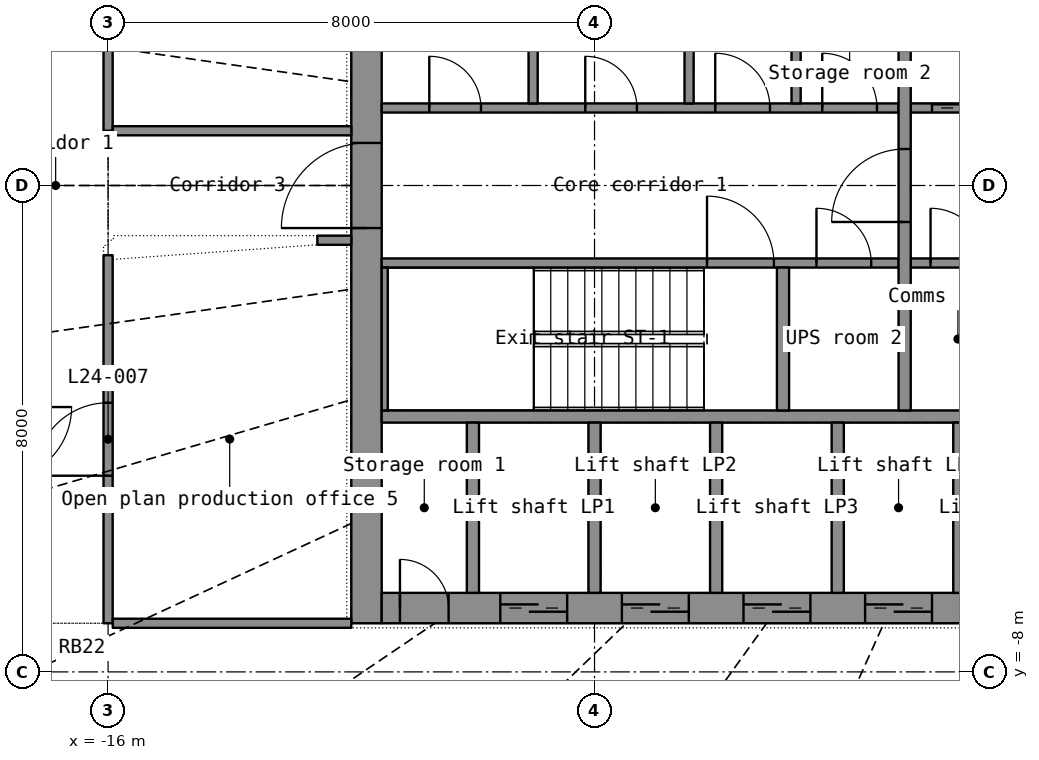
"""IFC4 building model, lengths in metres.
Left out: names, types, materials, properties, quantities, classifications, styles, units other than length and angle.
Written with IfcOpenShell. Run it as: python <this file> out.ifc"""

import sys

from ifc_helpers import new_model, si_unit, direction, frame, frame_2d, origin, place, context, subcontext, project, spatial, rectangle, extrude, element, fill, save


model = new_model("IFC4")
c1 = context("Model", 3, precision=1e-05, world=origin(), true_north=direction((0.0, 1.0)))
c2 = subcontext(c1, "Body", "Model", "MODEL_VIEW")
j1 = project(units=[si_unit("LENGTHUNIT", "METRE"), si_unit("PLANEANGLEUNIT", "RADIAN")], contexts=[c1])
p1 = place(None, origin())
s1 = spatial("IfcSite", under=j1, at=p1, CompositionType="ELEMENT")
p2 = place(p1, origin())
s2 = spatial("IfcBuilding", under=s1, at=p2, CompositionType="ELEMENT")
p3 = place(p2, frame((0.0, 0.0, 104.5)))
s3 = spatial("IfcBuildingStorey", under=s2, at=p3, CompositionType="ELEMENT", Elevation=104.5)
p4 = place(p3, frame((-11.75, -7.2, 0.0), z_axis=(0.0, 0.0, 1.0), x_axis=(0.0, 1.0, 0.0)))
e1 = element("IfcWall", 1, at=p4, inside=s3, PredefinedType="SHEAR", context=c2, shape_type="SweptSolid", body=[
    extrude(rectangle(XDim=14.4, YDim=0.5, at=frame_2d((7.2, 0.0))), origin(), (0.0, 0.0, 1.0), 3.3),
])
p5 = place(p4, frame((6.5, 0.0, 0.0)))
e2 = element("IfcOpeningElement", 2, at=p5, cuts=e1, PredefinedType="OPENING", context=c2, shape_type="SweptSolid", body=[
    extrude(rectangle(XDim=1.4, YDim=2.2, at=frame_2d((0.7, 1.1))), frame((0.0, 0.26, 0.0), z_axis=(0.0, -1.0, 0.0), x_axis=(1.0, 0.0, 0.0)), (0.0, 0.0, 1.0), 0.52),
])
p6 = place(p3, frame((-11.5, -6.95, 0.0), z_axis=(0.0, 0.0, 1.0), x_axis=(1.0, 0.0, 0.0)))
e3 = element("IfcWall", 3, at=p6, inside=s3, PredefinedType="SHEAR", context=c2, shape_type="SweptSolid", body=[
    extrude(rectangle(XDim=23.0, YDim=0.5, at=frame_2d((11.5, 0.0))), origin(), (0.0, 0.0, 1.0), 3.3),
])
p7 = place(p6, frame((1.95, 0.0, 0.0)))
e4 = element("IfcOpeningElement", 4, at=p7, cuts=e3, PredefinedType="OPENING", context=c2, shape_type="SweptSolid", body=[
    extrude(rectangle(XDim=1.1, YDim=2.2, at=frame_2d((0.55, 1.1))), frame((0.0, 0.26, 0.0), z_axis=(0.0, -1.0, 0.0), x_axis=(1.0, 0.0, 0.0)), (0.0, 0.0, 1.0), 0.52),
])
p8 = place(p6, frame((3.95, 0.0, 0.0)))
e5 = element("IfcOpeningElement", 5, at=p8, cuts=e3, PredefinedType="OPENING", context=c2, shape_type="SweptSolid", body=[
    extrude(rectangle(XDim=1.1, YDim=2.2, at=frame_2d((0.55, 1.1))), frame((0.0, 0.26, 0.0), z_axis=(0.0, -1.0, 0.0), x_axis=(1.0, 0.0, 0.0)), (0.0, 0.0, 1.0), 0.52),
])
p9 = place(p6, frame((5.95, 0.0, 0.0)))
e6 = element("IfcOpeningElement", 6, at=p9, cuts=e3, PredefinedType="OPENING", context=c2, shape_type="SweptSolid", body=[
    extrude(rectangle(XDim=1.1, YDim=2.2, at=frame_2d((0.55, 1.1))), frame((0.0, 0.26, 0.0), z_axis=(0.0, -1.0, 0.0), x_axis=(1.0, 0.0, 0.0)), (0.0, 0.0, 1.0), 0.52),
])
p10 = place(p6, frame((7.95, 0.0, 0.0)))
e7 = element("IfcOpeningElement", 7, at=p10, cuts=e3, PredefinedType="OPENING", context=c2, shape_type="SweptSolid", body=[
    extrude(rectangle(XDim=1.1, YDim=2.2, at=frame_2d((0.55, 1.1))), frame((0.0, 0.26, 0.0), z_axis=(0.0, -1.0, 0.0), x_axis=(1.0, 0.0, 0.0)), (0.0, 0.0, 1.0), 0.52),
])
p11 = place(p6, frame((9.95, 0.0, 0.0)))
e8 = element("IfcOpeningElement", 8, at=p11, cuts=e3, PredefinedType="OPENING", context=c2, shape_type="SweptSolid", body=[
    extrude(rectangle(XDim=1.1, YDim=2.2, at=frame_2d((0.55, 1.1))), frame((0.0, 0.26, 0.0), z_axis=(0.0, -1.0, 0.0), x_axis=(1.0, 0.0, 0.0)), (0.0, 0.0, 1.0), 0.52),
])
p12 = place(p6, frame((11.95, 0.0, 0.0)))
e9 = element("IfcOpeningElement", 9, at=p12, cuts=e3, PredefinedType="OPENING", context=c2, shape_type="SweptSolid", body=[
    extrude(rectangle(XDim=1.1, YDim=2.2, at=frame_2d((0.55, 1.1))), frame((0.0, 0.26, 0.0), z_axis=(0.0, -1.0, 0.0), x_axis=(1.0, 0.0, 0.0)), (0.0, 0.0, 1.0), 0.52),
])
p13 = place(p6, frame((13.95, 0.0, 0.0)))
e10 = element("IfcOpeningElement", 10, at=p13, cuts=e3, PredefinedType="OPENING", context=c2, shape_type="SweptSolid", body=[
    extrude(rectangle(XDim=1.1, YDim=2.2, at=frame_2d((0.55, 1.1))), frame((0.0, 0.26, 0.0), z_axis=(0.0, -1.0, 0.0), x_axis=(1.0, 0.0, 0.0)), (0.0, 0.0, 1.0), 0.52),
])
p14 = place(p6, frame((15.95, 0.0, 0.0)))
e11 = element("IfcOpeningElement", 11, at=p14, cuts=e3, PredefinedType="OPENING", context=c2, shape_type="SweptSolid", body=[
    extrude(rectangle(XDim=1.1, YDim=2.2, at=frame_2d((0.55, 1.1))), frame((0.0, 0.26, 0.0), z_axis=(0.0, -1.0, 0.0), x_axis=(1.0, 0.0, 0.0)), (0.0, 0.0, 1.0), 0.52),
])
p15 = place(p6, frame((19.95, 0.0, 0.0)))
e12 = element("IfcOpeningElement", 12, at=p15, cuts=e3, PredefinedType="OPENING", context=c2, shape_type="SweptSolid", body=[
    extrude(rectangle(XDim=1.1, YDim=2.2, at=frame_2d((0.55, 1.1))), frame((0.0, 0.26, 0.0), z_axis=(0.0, -1.0, 0.0), x_axis=(1.0, 0.0, 0.0)), (0.0, 0.0, 1.0), 0.52),
])
p16 = place(p6, frame((0.3, 0.0, 0.0)))
e13 = element("IfcOpeningElement", 13, at=p16, cuts=e3, PredefinedType="OPENING", context=c2, shape_type="SweptSolid", body=[
    extrude(rectangle(XDim=0.8, YDim=2.05, at=frame_2d((0.4, 1.025))), frame((0.0, 0.26, 0.0), z_axis=(0.0, -1.0, 0.0), x_axis=(1.0, 0.0, 0.0)), (0.0, 0.0, 1.0), 0.52),
])
p17 = place(p6, frame((21.9, 0.0, 0.0)))
e14 = element("IfcOpeningElement", 14, at=p17, cuts=e3, PredefinedType="OPENING", context=c2, shape_type="SweptSolid", body=[
    extrude(rectangle(XDim=0.8, YDim=2.05, at=frame_2d((0.4, 1.025))), frame((0.0, 0.26, 0.0), z_axis=(0.0, -1.0, 0.0), x_axis=(1.0, 0.0, 0.0)), (0.0, 0.0, 1.0), 0.52),
])
p18 = place(p3, frame((-11.5, -3.8, 0.0), z_axis=(0.0, 0.0, 1.0), x_axis=(1.0, 0.0, 0.0)))
e15 = element("IfcWall", 15, at=p18, inside=s3, PredefinedType="SHEAR", context=c2, shape_type="SweptSolid", body=[
    extrude(rectangle(XDim=23.0, YDim=0.2, at=frame_2d((11.5, 0.0))), origin(), (0.0, 0.0, 1.0), 3.3),
])
for number, where, z_axis, x_axis in (
    (16, (-10.0, -6.7, 0.0), (0.0, 0.0, 1.0), (0.0, 1.0, 0.0)),
    (17, (-8.0, -6.7, 0.0), (0.0, 0.0, 1.0), (0.0, 1.0, 0.0)),
    (18, (-6.0, -6.7, 0.0), (0.0, 0.0, 1.0), (0.0, 1.0, 0.0)),
    (19, (-4.0, -6.7, 0.0), (0.0, 0.0, 1.0), (0.0, 1.0, 0.0)),
    (20, (-2.0, -6.7, 0.0), (0.0, 0.0, 1.0), (0.0, 1.0, 0.0)),
):
    element("IfcWall", number, at=place(p3, frame(where, z_axis=z_axis, x_axis=x_axis)), inside=s3, PredefinedType="SHEAR", context=c2, shape_type="SweptSolid", body=[
        extrude(rectangle(XDim=2.8, YDim=0.2, at=frame_2d((1.4, 0.0))), origin(), (0.0, 0.0, 1.0), 3.3),
    ])
p19 = place(p3, frame((-11.5, -1.275, 0.0), z_axis=(0.0, 0.0, 1.0), x_axis=(1.0, 0.0, 0.0)))
e21 = element("IfcWall", 21, at=p19, inside=s3, PredefinedType="SHEAR", context=c2, shape_type="SweptSolid", body=[
    extrude(rectangle(XDim=8.5, YDim=0.15, at=frame_2d((4.25, 0.0))), origin(), (0.0, 0.0, 1.0), 3.3),
])
p20 = place(p19, frame((5.35, 0.0, 0.0)))
e22 = element("IfcOpeningElement", 22, at=p20, cuts=e21, PredefinedType="OPENING", context=c2, shape_type="SweptSolid", body=[
    extrude(rectangle(XDim=1.1, YDim=2.15, at=frame_2d((0.55, 1.075))), frame((0.0, 0.085, 0.0), z_axis=(0.0, -1.0, 0.0), x_axis=(1.0, 0.0, 0.0)), (0.0, 0.0, 1.0), 0.17),
])
p21 = place(p19, frame((7.15, 0.0, 0.0)))
e23 = element("IfcOpeningElement", 23, at=p21, cuts=e21, PredefinedType="OPENING", context=c2, shape_type="SweptSolid", body=[
    extrude(rectangle(XDim=0.9, YDim=2.1, at=frame_2d((0.45, 1.05))), frame((0.0, 0.085, 0.0), z_axis=(0.0, -1.0, 0.0), x_axis=(1.0, 0.0, 0.0)), (0.0, 0.0, 1.0), 0.17),
])
p22 = place(p3, frame((-2.8, -1.275, 0.0), z_axis=(0.0, 0.0, 1.0), x_axis=(1.0, 0.0, 0.0)))
e24 = element("IfcWall", 24, at=p22, inside=s3, PredefinedType="SHEAR", context=c2, shape_type="SweptSolid", body=[
    extrude(rectangle(XDim=5.6, YDim=0.15, at=frame_2d((2.8, 0.0))), origin(), (0.0, 0.0, 1.0), 3.3),
])
p23 = place(p22, frame((4.15, 0.0, 0.0)))
e25 = element("IfcOpeningElement", 25, at=p23, cuts=e24, PredefinedType="OPENING", context=c2, shape_type="SweptSolid", body=[
    extrude(rectangle(XDim=1.1, YDim=2.2, at=frame_2d((0.55, 1.1))), frame((0.0, 0.085, 0.0), z_axis=(0.0, -1.0, 0.0), x_axis=(1.0, 0.0, 0.0)), (0.0, 0.0, 1.0), 0.17),
])
p24 = place(p22, frame((0.326, 0.0, 0.0)))
e26 = element("IfcOpeningElement", 26, at=p24, cuts=e24, PredefinedType="OPENING", context=c2, shape_type="SweptSolid", body=[
    extrude(rectangle(XDim=0.9, YDim=2.1, at=frame_2d((0.45, 1.05))), frame((0.0, 0.085, 0.0), z_axis=(0.0, -1.0, 0.0), x_axis=(1.0, 0.0, 0.0)), (0.0, 0.0, 1.0), 0.17),
])
p25 = place(p22, frame((2.201, 0.0, 0.0)))
e27 = element("IfcOpeningElement", 27, at=p25, cuts=e24, PredefinedType="OPENING", context=c2, shape_type="SweptSolid", body=[
    extrude(rectangle(XDim=0.9, YDim=2.1, at=frame_2d((0.45, 1.05))), frame((0.0, 0.085, 0.0), z_axis=(0.0, -1.0, 0.0), x_axis=(1.0, 0.0, 0.0)), (0.0, 0.0, 1.0), 0.17),
])
p26 = place(p3, frame((-11.5, 1.275, 0.0), z_axis=(0.0, 0.0, 1.0), x_axis=(1.0, 0.0, 0.0)))
e28 = element("IfcWall", 28, at=p26, inside=s3, PredefinedType="PARTITIONING", context=c2, shape_type="SweptSolid", body=[
    extrude(rectangle(XDim=8.5, YDim=0.15, at=frame_2d((4.25, 0.0))), origin(), (0.0, 0.0, 1.0), 3.3),
])
p27 = place(p26, frame((0.782, 0.0, 0.0)))
e29 = element("IfcOpeningElement", 29, at=p27, cuts=e28, PredefinedType="OPENING", context=c2, shape_type="SweptSolid", body=[
    extrude(rectangle(XDim=0.85, YDim=2.1, at=frame_2d((0.425, 1.05))), frame((0.0, 0.085, 0.0), z_axis=(0.0, -1.0, 0.0), x_axis=(1.0, 0.0, 0.0)), (0.0, 0.0, 1.0), 0.17),
])
p28 = place(p26, frame((3.347, 0.0, 0.0)))
e30 = element("IfcOpeningElement", 30, at=p28, cuts=e28, PredefinedType="OPENING", context=c2, shape_type="SweptSolid", body=[
    extrude(rectangle(XDim=0.85, YDim=2.1, at=frame_2d((0.425, 1.05))), frame((0.0, 0.085, 0.0), z_axis=(0.0, -1.0, 0.0), x_axis=(1.0, 0.0, 0.0)), (0.0, 0.0, 1.0), 0.17),
])
p29 = place(p26, frame((5.485, 0.0, 0.0)))
e31 = element("IfcOpeningElement", 31, at=p29, cuts=e28, PredefinedType="OPENING", context=c2, shape_type="SweptSolid", body=[
    extrude(rectangle(XDim=0.9, YDim=2.1, at=frame_2d((0.45, 1.05))), frame((0.0, 0.085, 0.0), z_axis=(0.0, -1.0, 0.0), x_axis=(1.0, 0.0, 0.0)), (0.0, 0.0, 1.0), 0.17),
])
p30 = place(p26, frame((7.245, 0.0, 0.0)))
e32 = element("IfcOpeningElement", 32, at=p30, cuts=e28, PredefinedType="OPENING", context=c2, shape_type="SweptSolid", body=[
    extrude(rectangle(XDim=0.9, YDim=2.1, at=frame_2d((0.45, 1.05))), frame((0.0, 0.085, 0.0), z_axis=(0.0, -1.0, 0.0), x_axis=(1.0, 0.0, 0.0)), (0.0, 0.0, 1.0), 0.17),
])
p31 = place(p3, frame((-2.8, 1.275, 0.0), z_axis=(0.0, 0.0, 1.0), x_axis=(1.0, 0.0, 0.0)))
e33 = element("IfcWall", 33, at=p31, inside=s3, PredefinedType="SHEAR", context=c2, shape_type="SweptSolid", body=[
    extrude(rectangle(XDim=5.6, YDim=0.15, at=frame_2d((2.8, 0.0))), origin(), (0.0, 0.0, 1.0), 3.3),
])
p32 = place(p31, frame((0.35, 0.0, 0.0)))
e34 = element("IfcOpeningElement", 34, at=p32, cuts=e33, PredefinedType="OPENING", context=c2, shape_type="SweptSolid", body=[
    extrude(rectangle(XDim=1.1, YDim=2.2, at=frame_2d((0.55, 1.1))), frame((0.0, 0.085, 0.0), z_axis=(0.0, -1.0, 0.0), x_axis=(1.0, 0.0, 0.0)), (0.0, 0.0, 1.0), 0.17),
])
p33 = place(p31, frame((2.499, 0.0, 0.0)))
e35 = element("IfcOpeningElement", 35, at=p33, cuts=e33, PredefinedType="OPENING", context=c2, shape_type="SweptSolid", body=[
    extrude(rectangle(XDim=0.9, YDim=2.1, at=frame_2d((0.45, 1.05))), frame((0.0, 0.085, 0.0), z_axis=(0.0, -1.0, 0.0), x_axis=(1.0, 0.0, 0.0)), (0.0, 0.0, 1.0), 0.17),
])
p34 = place(p31, frame((4.374, 0.0, 0.0)))
e36 = element("IfcOpeningElement", 36, at=p34, cuts=e33, PredefinedType="OPENING", context=c2, shape_type="SweptSolid", body=[
    extrude(rectangle(XDim=0.9, YDim=2.1, at=frame_2d((0.45, 1.05))), frame((0.0, 0.085, 0.0), z_axis=(0.0, -1.0, 0.0), x_axis=(1.0, 0.0, 0.0)), (0.0, 0.0, 1.0), 0.17),
])
p35 = place(p3, frame((-2.9, -3.7, 0.0), z_axis=(0.0, 0.0, 1.0), x_axis=(0.0, 1.0, 0.0)))
e37 = element("IfcWall", 37, at=p35, inside=s3, PredefinedType="SHEAR", context=c2, shape_type="SweptSolid", body=[
    extrude(rectangle(XDim=7.4, YDim=0.2, at=frame_2d((3.7, 0.0))), origin(), (0.0, 0.0, 1.0), 3.3),
])
p36 = place(p35, frame((3.1, 0.0, 0.0)))
e38 = element("IfcOpeningElement", 38, at=p36, cuts=e37, PredefinedType="OPENING", context=c2, shape_type="SweptSolid", body=[
    extrude(rectangle(XDim=1.2, YDim=2.2, at=frame_2d((0.6, 1.1))), frame((0.0, 0.11, 0.0), z_axis=(0.0, -1.0, 0.0), x_axis=(1.0, 0.0, 0.0)), (0.0, 0.0, 1.0), 0.22),
])
p37 = place(p3, frame((-11.45, -3.7, 0.0), z_axis=(0.0, 0.0, 1.0), x_axis=(0.0, 1.0, 0.0)))
e39 = element("IfcWall", 39, at=p37, inside=s3, PredefinedType="SHEAR", context=c2, shape_type="SweptSolid", body=[
    extrude(rectangle(XDim=2.35, YDim=0.1, at=frame_2d((1.175, 0.0))), origin(), (0.0, 0.0, 1.0), 3.3),
])
p38 = place(p3, frame((-4.9, -3.7, 0.0), z_axis=(0.0, 0.0, 1.0), x_axis=(0.0, 1.0, 0.0)))
e40 = element("IfcWall", 40, at=p38, inside=s3, PredefinedType="SHEAR", context=c2, shape_type="SweptSolid", body=[
    extrude(rectangle(XDim=2.35, YDim=0.2, at=frame_2d((1.175, 0.0))), origin(), (0.0, 0.0, 1.0), 3.3),
])
for number, where, z_axis, x_axis in (
    (41, (-9.01, 1.35, 0.0), (0.0, 0.0, 1.0), (0.0, 1.0, 0.0)),
    (42, (-6.445, 1.35, 0.0), (0.0, 0.0, 1.0), (0.0, 1.0, 0.0)),
    (43, (-4.685, 1.35, 0.0), (0.0, 0.0, 1.0), (0.0, 1.0, 0.0)),
):
    element("IfcWall", number, at=place(p3, frame(where, z_axis=z_axis, x_axis=x_axis)), inside=s3, PredefinedType="PARTITIONING", context=c2, shape_type="SweptSolid", body=[
        extrude(rectangle(XDim=2.35, YDim=0.15, at=frame_2d((1.175, 0.0))), origin(), (0.0, 0.0, 1.0), 3.3),
    ])
p39 = place(p3, frame((-16.0, 0.9, 0.0), z_axis=(0.0, 0.0, 1.0), x_axis=(0.0, 1.0, 0.0)))
e44 = element("IfcWall", 44, at=p39, inside=s3, PredefinedType="PARTITIONING", context=c2, shape_type="SweptSolid", body=[
    extrude(rectangle(XDim=6.3, YDim=0.15, at=frame_2d((3.15, 0.0))), origin(), (0.0, 0.0, 1.0), 2.4),
])
p40 = place(p39, frame((2.55, 0.0, 0.0)))
e45 = element("IfcOpeningElement", 45, at=p40, cuts=e44, PredefinedType="OPENING", context=c2, shape_type="SweptSolid", body=[
    extrude(rectangle(XDim=1.2, YDim=2.2, at=frame_2d((0.6, 1.1))), frame((0.0, 0.085, 0.0), z_axis=(0.0, -1.0, 0.0), x_axis=(1.0, 0.0, 0.0)), (0.0, 0.0, 1.0), 0.17),
])
p41 = place(p3, frame((-16.0, -7.2, 0.0), z_axis=(0.0, 0.0, 1.0), x_axis=(0.0, 1.0, 0.0)))
e46 = element("IfcWall", 46, at=p41, inside=s3, PredefinedType="PARTITIONING", context=c2, shape_type="SweptSolid", body=[
    extrude(rectangle(XDim=6.053, YDim=0.15, at=frame_2d((3.027, 0.0))), origin(), (0.0, 0.0, 1.0), 2.4),
])
p42 = place(p41, frame((2.427, 0.0, 0.0)))
e47 = element("IfcOpeningElement", 47, at=p42, cuts=e46, PredefinedType="OPENING", context=c2, shape_type="SweptSolid", body=[
    extrude(rectangle(XDim=1.2, YDim=2.2, at=frame_2d((0.6, 1.1))), frame((0.0, 0.085, 0.0), z_axis=(0.0, -1.0, 0.0), x_axis=(1.0, 0.0, 0.0)), (0.0, 0.0, 1.0), 0.17),
])
for number, where, z_axis, x_axis in (
    (48, (-12.0, -7.2, 0.0), (0.0, 0.0, 1.0), (-1.0, 0.0, 0.0)),
    (49, (-12.0, 0.9, 0.0), (0.0, 0.0, 1.0), (-1.0, 0.0, 0.0)),
):
    element("IfcWall", number, at=place(p3, frame(where, z_axis=z_axis, x_axis=x_axis)), inside=s3, PredefinedType="PARTITIONING", context=c2, shape_type="SweptSolid", body=[
        extrude(rectangle(XDim=3.923, YDim=0.15, at=frame_2d((1.961, 0.0))), origin(), (0.0, 0.0, 1.0), 2.4),
    ])
p43 = place(p3, frame((-12.559, -0.9, 0.0), z_axis=(0.0, 0.0, 1.0), x_axis=(1.0, 0.0, 0.0)))
e50 = element("IfcWall", 50, at=p43, inside=s3, PredefinedType="PARTITIONING", context=c2, shape_type="SweptSolid", body=[
    extrude(rectangle(XDim=0.559, YDim=0.15, at=frame_2d((0.279, 0.0))), origin(), (0.0, 0.0, 1.0), 2.4),
])
p44 = place(p7, origin())
e51 = element("IfcDoor", 51, at=p44, inside=s3, OperationType="DOUBLE_DOOR_SLIDING", PredefinedType="DOOR", context=c2, shape_type="SweptSolid", body=[
    extrude(rectangle(XDim=1.1, YDim=2.2, at=frame_2d((0.55, 1.1))), frame((0.0, 0.025, 0.0), z_axis=(0.0, -1.0, 0.0), x_axis=(1.0, 0.0, 0.0)), (0.0, 0.0, 1.0), 0.05),
])
fill(e4, e51)
p45 = place(p8, origin())
e52 = element("IfcDoor", 52, at=p45, inside=s3, OperationType="DOUBLE_DOOR_SLIDING", PredefinedType="DOOR", context=c2, shape_type="SweptSolid", body=[
    extrude(rectangle(XDim=1.1, YDim=2.2, at=frame_2d((0.55, 1.1))), frame((0.0, 0.025, 0.0), z_axis=(0.0, -1.0, 0.0), x_axis=(1.0, 0.0, 0.0)), (0.0, 0.0, 1.0), 0.05),
])
fill(e5, e52)
p46 = place(p9, origin())
e53 = element("IfcDoor", 53, at=p46, inside=s3, OperationType="DOUBLE_DOOR_SLIDING", PredefinedType="DOOR", context=c2, shape_type="SweptSolid", body=[
    extrude(rectangle(XDim=1.1, YDim=2.2, at=frame_2d((0.55, 1.1))), frame((0.0, 0.025, 0.0), z_axis=(0.0, -1.0, 0.0), x_axis=(1.0, 0.0, 0.0)), (0.0, 0.0, 1.0), 0.05),
])
fill(e6, e53)
p47 = place(p10, origin())
e54 = element("IfcDoor", 54, at=p47, inside=s3, OperationType="DOUBLE_DOOR_SLIDING", PredefinedType="DOOR", context=c2, shape_type="SweptSolid", body=[
    extrude(rectangle(XDim=1.1, YDim=2.2, at=frame_2d((0.55, 1.1))), frame((0.0, 0.025, 0.0), z_axis=(0.0, -1.0, 0.0), x_axis=(1.0, 0.0, 0.0)), (0.0, 0.0, 1.0), 0.05),
])
fill(e7, e54)
p48 = place(p16, origin())
e55 = element("IfcDoor", 55, at=p48, inside=s3, OperationType="SINGLE_SWING_LEFT", PredefinedType="DOOR", context=c2, shape_type="SweptSolid", body=[
    extrude(rectangle(XDim=0.8, YDim=2.05, at=frame_2d((0.4, 1.025))), frame((0.0, 0.025, 0.0), z_axis=(0.0, -1.0, 0.0), x_axis=(1.0, 0.0, 0.0)), (0.0, 0.0, 1.0), 0.05),
])
fill(e13, e55)
p49 = place(p5, origin())
e56 = element("IfcDoor", 56, at=p49, inside=s3, OperationType="DOUBLE_DOOR_SINGLE_SWING", PredefinedType="DOOR", context=c2, shape_type="SweptSolid", body=[
    extrude(rectangle(XDim=1.4, YDim=2.2, at=frame_2d((0.7, 1.1))), frame((0.0, 0.025, 0.0), z_axis=(0.0, -1.0, 0.0), x_axis=(1.0, 0.0, 0.0)), (0.0, 0.0, 1.0), 0.05),
])
fill(e2, e56)
p50 = place(p36, origin())
e57 = element("IfcDoor", 57, at=p50, inside=s3, OperationType="SINGLE_SWING_LEFT", PredefinedType="DOOR", context=c2, shape_type="SweptSolid", body=[
    extrude(rectangle(XDim=1.2, YDim=2.2, at=frame_2d((0.6, 1.1))), frame((0.0, 0.025, 0.0), z_axis=(0.0, -1.0, 0.0), x_axis=(1.0, 0.0, 0.0)), (0.0, 0.0, 1.0), 0.05),
])
fill(e38, e57)
p51 = place(p32, origin())
e58 = element("IfcDoor", 58, at=p51, inside=s3, OperationType="DOUBLE_DOOR_SLIDING", PredefinedType="DOOR", context=c2, shape_type="SweptSolid", body=[
    extrude(rectangle(XDim=1.1, YDim=2.2, at=frame_2d((0.55, 1.1))), frame((0.0, 0.025, 0.0), z_axis=(0.0, -1.0, 0.0), x_axis=(1.0, 0.0, 0.0)), (0.0, 0.0, 1.0), 0.05),
])
fill(e34, e58)
p52 = place(p20, origin())
e59 = element("IfcDoor", 59, at=p52, inside=s3, OperationType="SINGLE_SWING_LEFT", PredefinedType="DOOR", context=c2, shape_type="SweptSolid", body=[
    extrude(rectangle(XDim=1.1, YDim=2.15, at=frame_2d((0.55, 1.075))), frame((0.0, 0.025, 0.0), z_axis=(0.0, -1.0, 0.0), x_axis=(1.0, 0.0, 0.0)), (0.0, 0.0, 1.0), 0.05),
])
fill(e22, e59)
p53 = place(p27, origin())
e60 = element("IfcDoor", 60, at=p53, inside=s3, OperationType="SINGLE_SWING_LEFT", PredefinedType="DOOR", context=c2, shape_type="SweptSolid", body=[
    extrude(rectangle(XDim=0.85, YDim=2.1, at=frame_2d((0.425, 1.05))), frame((0.0, 0.025, 0.0), z_axis=(0.0, -1.0, 0.0), x_axis=(1.0, 0.0, 0.0)), (0.0, 0.0, 1.0), 0.05),
])
fill(e29, e60)
p54 = place(p28, origin())
e61 = element("IfcDoor", 61, at=p54, inside=s3, OperationType="SINGLE_SWING_LEFT", PredefinedType="DOOR", context=c2, shape_type="SweptSolid", body=[
    extrude(rectangle(XDim=0.85, YDim=2.1, at=frame_2d((0.425, 1.05))), frame((0.0, 0.025, 0.0), z_axis=(0.0, -1.0, 0.0), x_axis=(1.0, 0.0, 0.0)), (0.0, 0.0, 1.0), 0.05),
])
fill(e30, e61)
p55 = place(p29, origin())
e62 = element("IfcDoor", 62, at=p55, inside=s3, OperationType="SINGLE_SWING_LEFT", PredefinedType="DOOR", context=c2, shape_type="SweptSolid", body=[
    extrude(rectangle(XDim=0.9, YDim=2.1, at=frame_2d((0.45, 1.05))), frame((0.0, 0.025, 0.0), z_axis=(0.0, -1.0, 0.0), x_axis=(1.0, 0.0, 0.0)), (0.0, 0.0, 1.0), 0.05),
])
fill(e31, e62)
p56 = place(p30, origin())
e63 = element("IfcDoor", 63, at=p56, inside=s3, OperationType="SINGLE_SWING_LEFT", PredefinedType="DOOR", context=c2, shape_type="SweptSolid", body=[
    extrude(rectangle(XDim=0.9, YDim=2.1, at=frame_2d((0.45, 1.05))), frame((0.0, 0.025, 0.0), z_axis=(0.0, -1.0, 0.0), x_axis=(1.0, 0.0, 0.0)), (0.0, 0.0, 1.0), 0.05),
])
fill(e32, e63)
p57 = place(p24, origin())
e64 = element("IfcDoor", 64, at=p57, inside=s3, OperationType="SINGLE_SWING_LEFT", PredefinedType="DOOR", context=c2, shape_type="SweptSolid", body=[
    extrude(rectangle(XDim=0.9, YDim=2.1, at=frame_2d((0.45, 1.05))), frame((0.0, 0.025, 0.0), z_axis=(0.0, -1.0, 0.0), x_axis=(1.0, 0.0, 0.0)), (0.0, 0.0, 1.0), 0.05),
])
fill(e26, e64)
p58 = place(p21, origin())
e65 = element("IfcDoor", 65, at=p58, inside=s3, OperationType="SINGLE_SWING_LEFT", PredefinedType="DOOR", context=c2, shape_type="SweptSolid", body=[
    extrude(rectangle(XDim=0.9, YDim=2.1, at=frame_2d((0.45, 1.05))), frame((0.0, 0.025, 0.0), z_axis=(0.0, -1.0, 0.0), x_axis=(1.0, 0.0, 0.0)), (0.0, 0.0, 1.0), 0.05),
])
fill(e23, e65)
p59 = place(p42, origin())
e66 = element("IfcDoor", 66, at=p59, inside=s3, OperationType="DOUBLE_DOOR_SINGLE_SWING", PredefinedType="DOOR", context=c2, shape_type="SweptSolid", body=[
    extrude(rectangle(XDim=1.2, YDim=2.2, at=frame_2d((0.6, 1.1))), frame((0.0, 0.025, 0.0), z_axis=(0.0, -1.0, 0.0), x_axis=(1.0, 0.0, 0.0)), (0.0, 0.0, 1.0), 0.05),
])
fill(e47, e66)
save(model, sys.argv[1])
